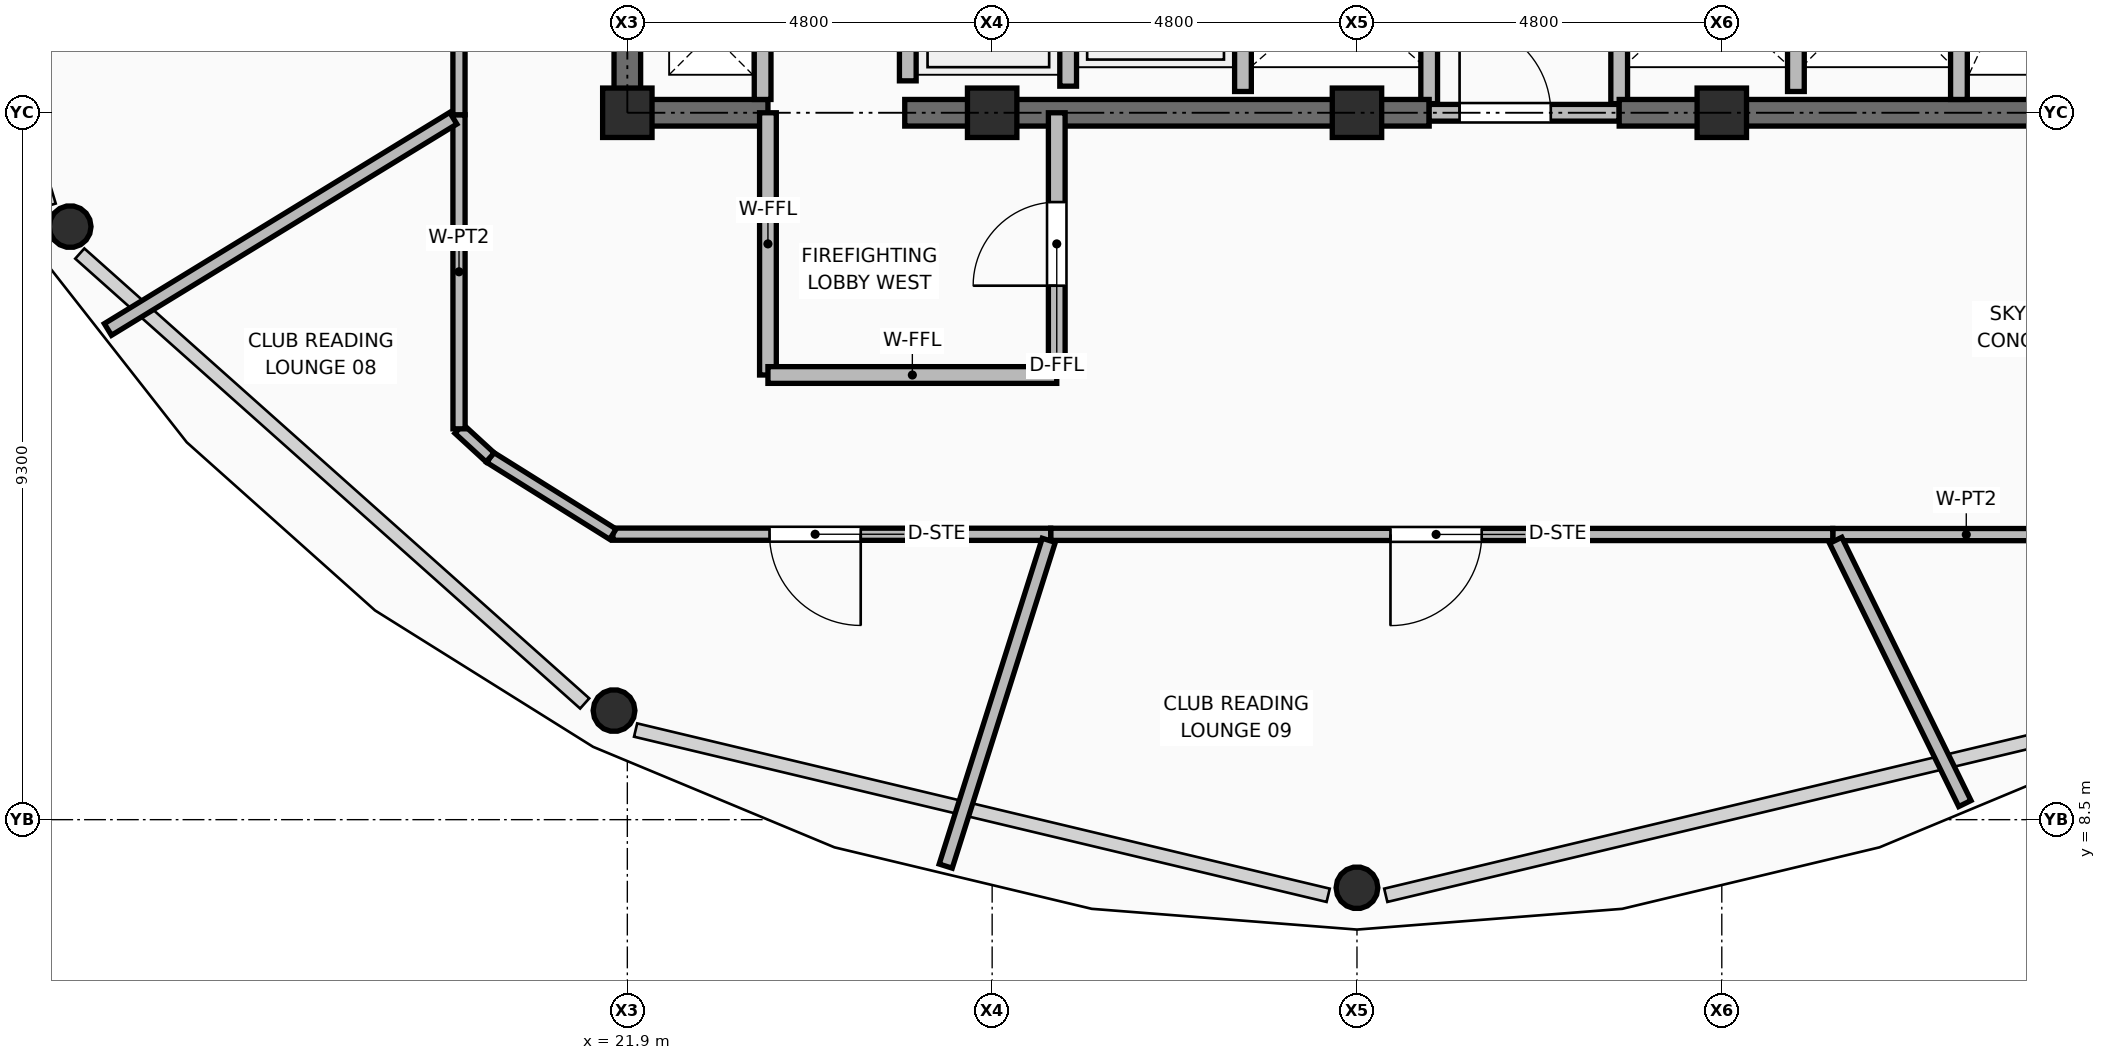
"""IFC4 building model, lengths in metres.
Left out: names, types, materials, properties, quantities, classifications, styles, units other than length and angle.
Written with IfcOpenShell. Run it as: python <this file> out.ifc"""

import sys

from ifc_helpers import new_model, si_unit, direction, frame, frame_2d, origin, origin_2d, place, context, subcontext, project, spatial, rectangle, hollow_circle, extrude, element, fill, save


model = new_model("IFC4")
c1 = context("Model", 3, precision=1e-05, world=origin(), true_north=direction((0.0, 1.0)))
c2 = subcontext(c1, "Body", "Model", "MODEL_VIEW")
j1 = project(units=[si_unit("LENGTHUNIT", "METRE"), si_unit("PLANEANGLEUNIT", "RADIAN")], contexts=[c1])
p1 = place(None, origin())
s1 = spatial("IfcSite", under=j1, at=p1, CompositionType="ELEMENT")
p2 = place(p1, origin())
s2 = spatial("IfcBuilding", under=s1, at=p2, CompositionType="ELEMENT")
p3 = place(p2, frame((0.0, 0.0, 278.85)))
s3 = spatial("IfcBuildingStorey", under=s2, at=p3, CompositionType="ELEMENT", Elevation=278.85)
for number, where, z_axis, x_axis in (
    (1, (21.9, 17.8, 0.0), (0.0, 0.0, 1.0), (1.0, 0.0, 0.0)),
    (2, (26.7, 17.8, 0.0), (0.0, 0.0, 1.0), (1.0, 0.0, 0.0)),
    (3, (31.5, 17.8, 0.0), (0.0, 0.0, 1.0), (1.0, 0.0, 0.0)),
    (4, (36.3, 17.8, 0.0), (0.0, 0.0, 1.0), (1.0, 0.0, 0.0)),
):
    element("IfcColumn", number, at=place(p3, frame(where, z_axis=z_axis, x_axis=x_axis)), inside=s3, PredefinedType="COLUMN", context=c2, shape_type="SweptSolid", body=[
        extrude(rectangle(XDim=0.65, YDim=0.65, at=origin_2d()), origin(), (0.0, 0.0, 1.0), 3.75),
    ])
p4 = place(p3, frame((14.569, 16.302, 0.0), z_axis=(0.185218066702, 0.09531807333, 0.978063767177), x_axis=(-0.457587432232, 0.889164631474, 0.0)))
e5 = element("IfcColumn", 5, at=p4, inside=s3, PredefinedType="COLUMN", context=c2, shape_type="SweptSolid", body=[
    extrude(hollow_circle(Radius=0.275, WallThickness=0.025, at=origin_2d()), origin(), (0.0, 0.0, 1.0), 3.65),
])
p5 = place(p3, frame((21.725, 9.935, 0.0), z_axis=(0.107078897733, 0.165345373706, 0.980405537038), x_axis=(-0.839360059296, 0.543575837265, 0.0)))
e6 = element("IfcColumn", 6, at=p5, inside=s3, PredefinedType="COLUMN", context=c2, shape_type="SweptSolid", body=[
    extrude(hollow_circle(Radius=0.275, WallThickness=0.025, at=origin_2d()), origin(), (0.0, 0.0, 1.0), 3.641),
])
p6 = place(p3, frame((31.5, 7.604, 0.0), z_axis=(0.0, 0.191376297921, 0.981516740863), x_axis=(-1.0, 0.0, 0.0)))
e7 = element("IfcColumn", 7, at=p6, inside=s3, PredefinedType="COLUMN", context=c2, shape_type="SweptSolid", body=[
    extrude(hollow_circle(Radius=0.275, WallThickness=0.025, at=origin_2d()), origin(), (0.0, 0.0, 1.0), 3.637),
])
p7 = place(p3, frame((30.0, 18.08, 0.0), z_axis=(0.0, 0.0, 1.0), x_axis=(0.0, 1.0, 0.0)))
e8 = element("IfcWall", 8, at=p7, inside=s3, PredefinedType="PARTITIONING", context=c2, shape_type="SweptSolid", body=[
    extrude(rectangle(XDim=2.9, YDim=0.22, at=frame_2d((1.45, 0.0))), origin(), (0.0, 0.0, 1.0), 3.545),
])
for number, where, z_axis, x_axis in (
    (9, (32.45, 17.92, 0.0), (0.0, 0.0, 1.0), (0.0, 1.0, 0.0)),
    (10, (34.95, 17.92, 0.0), (0.0, 0.0, 1.0), (0.0, 1.0, 0.0)),
):
    element("IfcWall", number, at=place(p3, frame(where, z_axis=z_axis, x_axis=x_axis)), inside=s3, PredefinedType="PARTITIONING", context=c2, shape_type="SweptSolid", body=[
        extrude(rectangle(XDim=2.47, YDim=0.22, at=frame_2d((1.235, 0.0))), origin(), (0.0, 0.0, 1.0), 3.545),
    ])
p8 = place(p3, frame((37.275, 18.08, 0.0), z_axis=(0.0, 0.0, 1.0), x_axis=(0.0, 1.0, 0.0)))
e11 = element("IfcWall", 11, at=p8, inside=s3, PredefinedType="PARTITIONING", context=c2, shape_type="SweptSolid", body=[
    extrude(rectangle(XDim=2.31, YDim=0.22, at=frame_2d((1.155, 0.0))), origin(), (0.0, 0.0, 1.0), 3.545),
])
p9 = place(p3, frame((21.725, 17.8, 0.0), z_axis=(0.0, 0.0, 1.0), x_axis=(1.0, 0.0, 0.0)))
e12 = element("IfcWall", 12, at=p9, inside=s3, PredefinedType="SHEAR", context=c2, shape_type="SweptSolid", body=[
    extrude(rectangle(XDim=2.025, YDim=0.35, at=frame_2d((1.012, 0.0))), origin(), (0.0, 0.0, 1.0), 3.57),
])
p10 = place(p3, frame((25.55, 17.8, 0.0), z_axis=(0.0, 0.0, 1.0), x_axis=(1.0, 0.0, 0.0)))
e13 = element("IfcWall", 13, at=p10, inside=s3, PredefinedType="SHEAR", context=c2, shape_type="SweptSolid", body=[
    extrude(rectangle(XDim=6.9, YDim=0.35, at=frame_2d((3.45, 0.0))), origin(), (0.0, 0.0, 1.0), 3.57),
])
p11 = place(p3, frame((32.45, 17.8, 0.0), z_axis=(0.0, 0.0, 1.0), x_axis=(1.0, 0.0, 0.0)))
e14 = element("IfcWall", 14, at=p11, inside=s3, PredefinedType="PARTITIONING", context=c2, shape_type="SweptSolid", body=[
    extrude(rectangle(XDim=2.5, YDim=0.22, at=frame_2d((1.25, 0.0))), origin(), (0.0, 0.0, 1.0), 3.132),
])
p12 = place(p11, frame((0.4, 0.0, 0.0)))
e15 = element("IfcOpeningElement", 15, at=p12, cuts=e14, PredefinedType="OPENING", context=c2, shape_type="SweptSolid", body=[
    extrude(rectangle(XDim=1.2, YDim=2.1, at=frame_2d((0.6, 1.05))), frame((0.0, 0.12, 0.0), z_axis=(0.0, -1.0, 0.0), x_axis=(1.0, 0.0, 0.0)), (0.0, 0.0, 1.0), 0.24),
])
p13 = place(p3, frame((34.95, 17.8, 0.0), z_axis=(0.0, 0.0, 1.0), x_axis=(1.0, 0.0, 0.0)))
e16 = element("IfcWall", 16, at=p13, inside=s3, PredefinedType="SHEAR", context=c2, shape_type="SweptSolid", body=[
    extrude(rectangle(XDim=6.325, YDim=0.35, at=frame_2d((3.163, 0.0))), origin(), (0.0, 0.0, 1.0), 3.57),
])
p14 = place(p3, frame((21.9, 17.975, 0.0), z_axis=(0.0, 0.0, 1.0), x_axis=(0.0, 1.0, 0.0)))
e17 = element("IfcWall", 17, at=p14, inside=s3, PredefinedType="SHEAR", context=c2, shape_type="SweptSolid", body=[
    extrude(rectangle(XDim=14.3, YDim=0.35, at=frame_2d((7.15, 0.0))), origin(), (0.0, 0.0, 1.0), 3.57),
])
p15 = place(p3, frame((23.68, 17.975, 0.0), z_axis=(0.0, 0.0, 1.0), x_axis=(0.0, 1.0, 0.0)))
e18 = element("IfcWall", 18, at=p15, inside=s3, PredefinedType="PARTITIONING", context=c2, shape_type="SweptSolid", body=[
    extrude(rectangle(XDim=1.575, YDim=0.22, at=frame_2d((0.788, 0.0))), origin(), (0.0, 0.0, 1.0), 3.132),
])
p16 = place(p3, frame((39.42, 17.975, 0.0), z_axis=(0.0, 0.0, 1.0), x_axis=(0.0, 1.0, 0.0)))
e19 = element("IfcWall", 19, at=p16, inside=s3, PredefinedType="PARTITIONING", context=c2, shape_type="SweptSolid", body=[
    extrude(rectangle(XDim=2.975, YDim=0.22, at=frame_2d((1.487, 0.0))), origin(), (0.0, 0.0, 1.0), 3.132),
])
p17 = place(p3, frame((25.59, 18.22, 0.0), z_axis=(0.0, 0.0, 1.0), x_axis=(0.0, 1.0, 0.0)))
e20 = element("IfcWall", 20, at=p17, inside=s3, PredefinedType="PARTITIONING", context=c2, shape_type="SweptSolid", body=[
    extrude(rectangle(XDim=2.76, YDim=0.22, at=frame_2d((1.38, 0.0))), origin(), (0.0, 0.0, 1.0), 3.55),
])
p18 = place(p17, frame((0.83, 0.0, 0.0)))
e21 = element("IfcOpeningElement", 21, at=p18, cuts=e20, PredefinedType="OPENING", context=c2, shape_type="SweptSolid", body=[
    extrude(rectangle(XDim=1.1, YDim=2.2, at=frame_2d((0.55, 1.1))), frame((0.0, 0.12, 0.0), z_axis=(0.0, -1.0, 0.0), x_axis=(1.0, 0.0, 0.0)), (0.0, 0.0, 1.0), 0.24),
])
p19 = place(p3, frame((27.7, 18.15, 0.0), z_axis=(0.0, 0.0, 1.0), x_axis=(0.0, 1.0, 0.0)))
e22 = element("IfcWall", 22, at=p19, inside=s3, PredefinedType="PARTITIONING", context=c2, shape_type="SweptSolid", body=[
    extrude(rectangle(XDim=2.95, YDim=0.22, at=frame_2d((1.475, 0.0))), origin(), (0.0, 0.0, 1.0), 3.55),
])
p20 = place(p3, frame((23.75, 14.35, 0.0), z_axis=(0.0, 0.0, 1.0), x_axis=(0.0, 1.0, 0.0)))
e23 = element("IfcWall", 23, at=p20, inside=s3, PredefinedType="PARTITIONING", context=c2, shape_type="SweptSolid", body=[
    extrude(rectangle(XDim=3.45, YDim=0.22, at=frame_2d((1.725, 0.0))), origin(), (0.0, 0.0, 1.0), 3.132),
])
p21 = place(p3, frame((23.75, 14.35, 0.0), z_axis=(0.0, 0.0, 1.0), x_axis=(1.0, 0.0, 0.0)))
e24 = element("IfcWall", 24, at=p21, inside=s3, PredefinedType="PARTITIONING", context=c2, shape_type="SweptSolid", body=[
    extrude(rectangle(XDim=3.8, YDim=0.22, at=frame_2d((1.9, 0.0))), origin(), (0.0, 0.0, 1.0), 3.55),
])
p22 = place(p3, frame((27.55, 14.35, 0.0), z_axis=(0.0, 0.0, 1.0), x_axis=(0.0, 1.0, 0.0)))
e25 = element("IfcWall", 25, at=p22, inside=s3, PredefinedType="PARTITIONING", context=c2, shape_type="SweptSolid", body=[
    extrude(rectangle(XDim=3.45, YDim=0.22, at=frame_2d((1.725, 0.0))), origin(), (0.0, 0.0, 1.0), 3.132),
])
p23 = place(p22, frame((1.175, 0.0, 0.0)))
e26 = element("IfcOpeningElement", 26, at=p23, cuts=e25, PredefinedType="OPENING", context=c2, shape_type="SweptSolid", body=[
    extrude(rectangle(XDim=1.1, YDim=2.1, at=frame_2d((0.55, 1.05))), frame((0.0, 0.12, 0.0), z_axis=(0.0, -1.0, 0.0), x_axis=(1.0, 0.0, 0.0)), (0.0, 0.0, 1.0), 0.24),
])
p24 = place(p3, frame((41.273, 12.25, 0.0), z_axis=(0.0, 0.0, 1.0), x_axis=(-0.999999961361, 0.000277990121, 0.0)))
e27 = element("IfcWall", 27, at=p24, inside=s3, PredefinedType="PARTITIONING", context=c2, shape_type="SweptSolid", body=[
    extrude(rectangle(XDim=3.513, YDim=0.16, at=frame_2d((1.756, 0.0))), origin(), (0.0, 0.0, 1.0), 3.132),
])
p25 = place(p3, frame((37.76, 12.251, 0.0), z_axis=(0.0, 0.0, 1.0), x_axis=(-0.99999995947, 0.000284711007, 0.0)))
e28 = element("IfcWall", 28, at=p25, inside=s3, PredefinedType="PARTITIONING", context=c2, shape_type="SweptSolid", body=[
    extrude(rectangle(XDim=10.29, YDim=0.16, at=frame_2d((5.145, 0.0))), origin(), (0.0, 0.0, 1.0), 3.132),
])
p26 = place(p25, frame((4.619, 0.0, 0.0)))
e29 = element("IfcOpeningElement", 29, at=p26, cuts=e28, PredefinedType="OPENING", context=c2, shape_type="SweptSolid", body=[
    extrude(rectangle(XDim=1.2, YDim=2.1, at=frame_2d((0.6, 1.05))), frame((0.0, 0.09, 0.0), z_axis=(0.0, -1.0, 0.0), x_axis=(1.0, 0.0, 0.0)), (0.0, 0.0, 1.0), 0.18),
])
p27 = place(p3, frame((27.47, 12.254, 0.0), z_axis=(0.0, 0.0, 1.0), x_axis=(-0.999999927241, 0.000381469052, 0.0)))
e30 = element("IfcWall", 30, at=p27, inside=s3, PredefinedType="PARTITIONING", context=c2, shape_type="SweptSolid", body=[
    extrude(rectangle(XDim=5.76, YDim=0.16, at=frame_2d((2.88, 0.0))), origin(), (0.0, 0.0, 1.0), 3.132),
])
p28 = place(p27, frame((2.499, 0.0, 0.0)))
e31 = element("IfcOpeningElement", 31, at=p28, cuts=e30, PredefinedType="OPENING", context=c2, shape_type="SweptSolid", body=[
    extrude(rectangle(XDim=1.2, YDim=2.1, at=frame_2d((0.6, 1.05))), frame((0.0, 0.09, 0.0), z_axis=(0.0, -1.0, 0.0), x_axis=(1.0, 0.0, 0.0)), (0.0, 0.0, 1.0), 0.18),
])
p29 = place(p3, frame((21.71, 12.256, 0.0), z_axis=(0.0, 0.0, 1.0), x_axis=(-0.847847057247, 0.530240858024, 0.0)))
e32 = element("IfcWall", 32, at=p29, inside=s3, PredefinedType="PARTITIONING", context=c2, shape_type="SweptSolid", body=[
    extrude(rectangle(XDim=1.905, YDim=0.16, at=frame_2d((0.952, 0.0))), origin(), (0.0, 0.0, 1.0), 3.55),
])
p30 = place(p3, frame((20.095, 13.266, 0.0), z_axis=(0.0, 0.0, 1.0), x_axis=(-0.736149957839, 0.6768184687, 0.0)))
e33 = element("IfcWall", 33, at=p30, inside=s3, PredefinedType="PARTITIONING", context=c2, shape_type="SweptSolid", body=[
    extrude(rectangle(XDim=0.555, YDim=0.16, at=frame_2d((0.278, 0.0))), origin(), (0.0, 0.0, 1.0), 3.55),
])
p31 = place(p3, frame((19.686, 13.642, 0.0), z_axis=(0.0, 0.0, 1.0), x_axis=(-0.000236350738, 0.999999972069, 0.0)))
e34 = element("IfcWall", 34, at=p31, inside=s3, PredefinedType="PARTITIONING", context=c2, shape_type="SweptSolid", body=[
    extrude(rectangle(XDim=4.132, YDim=0.16, at=frame_2d((2.066, 0.0))), origin(), (0.0, 0.0, 1.0), 3.132),
])
p32 = place(p3, frame((19.685, 17.774, 0.0), z_axis=(0.0, 0.0, 1.0), x_axis=(0.0, 1.0, 0.0)))
e35 = element("IfcWall", 35, at=p32, inside=s3, PredefinedType="PARTITIONING", context=c2, shape_type="SweptSolid", body=[
    extrude(rectangle(XDim=4.949, YDim=0.16, at=frame_2d((2.475, 0.0))), origin(), (0.0, 0.0, 1.0), 3.132),
])
p33 = place(p32, frame((1.949, 0.0, 0.0)))
e36 = element("IfcOpeningElement", 36, at=p33, cuts=e35, PredefinedType="OPENING", context=c2, shape_type="SweptSolid", body=[
    extrude(rectangle(XDim=1.2, YDim=2.1, at=frame_2d((0.6, 1.05))), frame((0.0, 0.09, 0.0), z_axis=(0.0, -1.0, 0.0), x_axis=(1.0, 0.0, 0.0)), (0.0, 0.0, 1.0), 0.18),
])
p34 = place(p3, frame((19.61, 17.728, 0.0), z_axis=(0.0, 0.0, 1.0), x_axis=(-0.853110707967, -0.521729930091, 0.0)))
e37 = element("IfcWall", 37, at=p34, inside=s3, PredefinedType="PARTITIONING", context=c2, shape_type="SweptSolid", body=[
    extrude(rectangle(XDim=5.327, YDim=0.18, at=frame_2d((2.663, 0.0))), origin(), (0.0, 0.0, 1.0), 3.003),
])
p35 = place(p3, frame((27.445, 12.175, 0.0), z_axis=(0.0, 0.0, 1.0), x_axis=(-0.301625158596, -0.95342659062, 0.0)))
e38 = element("IfcWall", 38, at=p35, inside=s3, PredefinedType="PARTITIONING", context=c2, shape_type="SweptSolid", body=[
    extrude(rectangle(XDim=4.496, YDim=0.18, at=frame_2d((2.248, 0.0))), origin(), (0.0, 0.0, 1.0), 3.003),
])
p36 = place(p3, frame((37.798, 12.175, 0.0), z_axis=(0.0, 0.0, 1.0), x_axis=(0.440645375208, -0.897681264875, 0.0)))
e39 = element("IfcWall", 39, at=p36, inside=s3, PredefinedType="PARTITIONING", context=c2, shape_type="SweptSolid", body=[
    extrude(rectangle(XDim=3.858, YDim=0.18, at=frame_2d((1.929, 0.0))), origin(), (0.0, 0.0, 1.0), 3.003),
])
p37 = place(p12, origin())
e40 = element("IfcDoor", 40, at=p37, inside=s3, OperationType="SINGLE_SWING_LEFT", PredefinedType="DOOR", context=c2, shape_type="SweptSolid", body=[
    extrude(rectangle(XDim=1.2, YDim=2.1, at=frame_2d((0.6, 1.05))), frame((0.0, 0.025, 0.0), z_axis=(0.0, -1.0, 0.0), x_axis=(1.0, 0.0, 0.0)), (0.0, 0.0, 1.0), 0.05),
])
fill(e15, e40)
p38 = place(p23, origin())
e41 = element("IfcDoor", 41, at=p38, inside=s3, OperationType="SINGLE_SWING_LEFT", PredefinedType="DOOR", context=c2, shape_type="SweptSolid", body=[
    extrude(rectangle(XDim=1.1, YDim=2.1, at=frame_2d((0.55, 1.05))), frame((0.0, 0.025, 0.0), z_axis=(0.0, -1.0, 0.0), x_axis=(1.0, 0.0, 0.0)), (0.0, 0.0, 1.0), 0.05),
])
fill(e26, e41)
p39 = place(p28, origin())
e42 = element("IfcDoor", 42, at=p39, inside=s3, OperationType="SINGLE_SWING_LEFT", PredefinedType="DOOR", context=c2, shape_type="SweptSolid", body=[
    extrude(rectangle(XDim=1.2, YDim=2.1, at=frame_2d((0.6, 1.05))), frame((0.0, 0.025, 0.0), z_axis=(0.0, -1.0, 0.0), x_axis=(1.0, 0.0, 0.0)), (0.0, 0.0, 1.0), 0.05),
])
fill(e31, e42)
p40 = place(p26, origin())
e43 = element("IfcDoor", 43, at=p40, inside=s3, OperationType="SINGLE_SWING_RIGHT", PredefinedType="DOOR", context=c2, shape_type="SweptSolid", body=[
    extrude(rectangle(XDim=1.2, YDim=2.1, at=frame_2d((0.6, 1.05))), frame((0.0, 0.025, 0.0), z_axis=(0.0, -1.0, 0.0), x_axis=(1.0, 0.0, 0.0)), (0.0, 0.0, 1.0), 0.05),
])
fill(e29, e43)
save(model, sys.argv[1])
